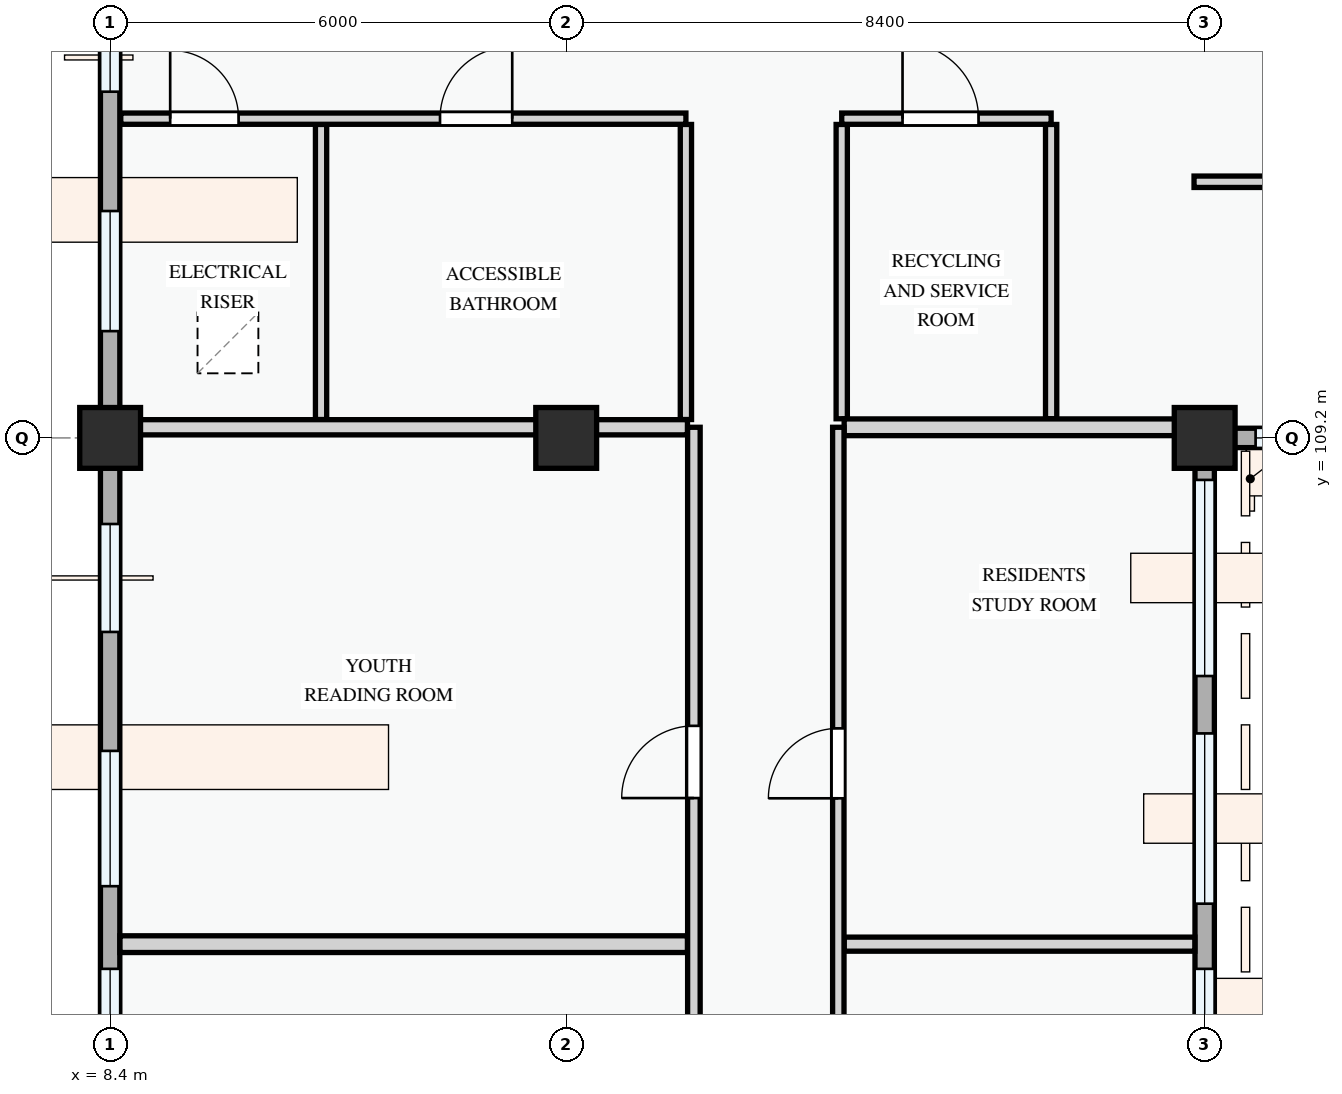
"""IFC4 building model, lengths in metres.
Left out: names, types, materials, properties, quantities, classifications, styles, units other than length and angle.
Written with IfcOpenShell. Run it as: python <this file> out.ifc"""

import sys

from ifc_helpers import new_model, si_unit, direction, frame, frame_2d, origin, origin_2d, place, context, subcontext, project, spatial, rectangle, extrude, element, fill, save


model = new_model("IFC4")
c1 = context("Model", 3, precision=1e-05, world=origin(), true_north=direction((0.0, 1.0)))
c2 = subcontext(c1, "Body", "Model", "MODEL_VIEW")
j1 = project(units=[si_unit("LENGTHUNIT", "METRE"), si_unit("PLANEANGLEUNIT", "RADIAN")], contexts=[c1])
p1 = place(None, origin())
s1 = spatial("IfcSite", under=j1, at=p1, CompositionType="ELEMENT")
p2 = place(p1, origin())
s2 = spatial("IfcBuilding", under=s1, at=p2, CompositionType="ELEMENT")
p3 = place(p2, frame((0.0, 0.0, 4.5)))
s3 = spatial("IfcBuildingStorey", under=s2, at=p3, CompositionType="ELEMENT", Elevation=4.5)
for number, where, z_axis, x_axis in (
    (1, (8.4, 109.2, 0.0), (0.0, 0.0, 1.0), (1.0, 0.0, 0.0)),
    (2, (14.4, 109.2, 0.0), (0.0, 0.0, 1.0), (1.0, 0.0, 0.0)),
    (3, (22.8, 109.2, 0.0), (0.0, 0.0, 1.0), (1.0, 0.0, 0.0)),
):
    element("IfcColumn", number, at=place(p3, frame(where, z_axis=z_axis, x_axis=x_axis)), inside=s3, PredefinedType="COLUMN", context=c2, shape_type="SweptSolid", body=[
        extrude(rectangle(XDim=0.8, YDim=0.8, at=origin_2d()), origin(), (0.0, 0.0, 1.0), 3.6),
    ])
p4 = place(p3, frame((22.8, 109.2, 0.0), z_axis=(0.0, 0.0, 1.0), x_axis=(1.0, 0.0, 0.0)))
e4 = element("IfcWall", 4, at=p4, inside=s3, PredefinedType="STANDARD", context=c2, shape_type="SweptSolid", body=[
    extrude(rectangle(XDim=6.0, YDim=0.255, at=frame_2d((3.0, 0.0))), origin(), (0.0, 0.0, 1.0), 2.775),
])
p5 = place(p4, frame((0.67, 0.0, 0.78)))
e5 = element("IfcOpeningElement", 5, at=p5, cuts=e4, PredefinedType="OPENING", context=c2, shape_type="SweptSolid", body=[
    extrude(rectangle(XDim=1.2, YDim=1.5, at=frame_2d((0.6, 0.75))), frame((0.0, 0.137, 0.0), z_axis=(0.0, -1.0, 0.0), x_axis=(1.0, 0.0, 0.0)), (0.0, 0.0, 1.0), 0.275),
])
p6 = place(p4, frame((2.88, 0.0, 0.78)))
e6 = element("IfcOpeningElement", 6, at=p6, cuts=e4, PredefinedType="OPENING", context=c2, shape_type="SweptSolid", body=[
    extrude(rectangle(XDim=2.4, YDim=1.85, at=frame_2d((1.2, 0.925))), frame((0.0, 0.137, 0.0), z_axis=(0.0, -1.0, 0.0), x_axis=(1.0, 0.0, 0.0)), (0.0, 0.0, 1.0), 0.275),
])
p7 = place(p3, frame((8.4, 115.2, 0.0), z_axis=(0.0, 0.0, 1.0), x_axis=(0.0, -1.0, 0.0)))
e7 = element("IfcWall", 7, at=p7, inside=s3, PredefinedType="STANDARD", context=c2, shape_type="SweptSolid", body=[
    extrude(rectangle(XDim=6.0, YDim=0.255, at=frame_2d((3.0, 0.0))), origin(), (0.0, 0.0, 1.0), 2.875),
])
p8 = place(p7, frame((0.545, 0.0, 0.78)))
e8 = element("IfcOpeningElement", 8, at=p8, cuts=e7, PredefinedType="OPENING", context=c2, shape_type="SweptSolid", body=[
    extrude(rectangle(XDim=0.9, YDim=1.2, at=frame_2d((0.45, 0.6))), frame((0.0, 0.137, 0.0), z_axis=(0.0, -1.0, 0.0), x_axis=(1.0, 0.0, 0.0)), (0.0, 0.0, 1.0), 0.275),
])
p9 = place(p7, frame((3.015, 0.0, 0.78)))
e9 = element("IfcOpeningElement", 9, at=p9, cuts=e7, PredefinedType="OPENING", context=c2, shape_type="SweptSolid", body=[
    extrude(rectangle(XDim=1.58, YDim=1.48, at=frame_2d((0.79, 0.74))), frame((0.0, 0.137, 0.0), z_axis=(0.0, -1.0, 0.0), x_axis=(1.0, 0.0, 0.0)), (0.0, 0.0, 1.0), 0.275),
])
p10 = place(p3, frame((8.4, 109.2, 0.0), z_axis=(0.0, 0.0, 1.0), x_axis=(0.0, -1.0, 0.0)))
e10 = element("IfcWall", 10, at=p10, inside=s3, PredefinedType="STANDARD", context=c2, shape_type="SweptSolid", body=[
    extrude(rectangle(XDim=8.4, YDim=0.255, at=frame_2d((4.2, 0.0))), origin(), (0.0, 0.0, 1.0), 2.725),
])
p11 = place(p10, frame((1.133, 0.0, 0.78)))
e11 = element("IfcOpeningElement", 11, at=p11, cuts=e10, PredefinedType="OPENING", context=c2, shape_type="SweptSolid", body=[
    extrude(rectangle(XDim=1.42, YDim=1.38, at=frame_2d((0.71, 0.69))), frame((0.0, 0.137, 0.0), z_axis=(0.0, -1.0, 0.0), x_axis=(1.0, 0.0, 0.0)), (0.0, 0.0, 1.0), 0.275),
])
p12 = place(p10, frame((4.117, 0.0, 0.78)))
e12 = element("IfcOpeningElement", 12, at=p12, cuts=e10, PredefinedType="OPENING", context=c2, shape_type="SweptSolid", body=[
    extrude(rectangle(XDim=1.78, YDim=1.42, at=frame_2d((0.89, 0.71))), frame((0.0, 0.137, 0.0), z_axis=(0.0, -1.0, 0.0), x_axis=(1.0, 0.0, 0.0)), (0.0, 0.0, 1.0), 0.275),
])
p13 = place(p10, frame((6.985, 0.0, 0.78)))
e13 = element("IfcOpeningElement", 13, at=p13, cuts=e10, PredefinedType="OPENING", context=c2, shape_type="SweptSolid", body=[
    extrude(rectangle(XDim=0.9, YDim=1.2, at=frame_2d((0.45, 0.6))), frame((0.0, 0.137, 0.0), z_axis=(0.0, -1.0, 0.0), x_axis=(1.0, 0.0, 0.0)), (0.0, 0.0, 1.0), 0.275),
])
p14 = place(p3, frame((22.8, 100.8, 0.0), z_axis=(0.0, 0.0, 1.0), x_axis=(0.0, 1.0, 0.0)))
e14 = element("IfcWall", 14, at=p14, inside=s3, PredefinedType="STANDARD", context=c2, shape_type="SweptSolid", body=[
    extrude(rectangle(XDim=8.4, YDim=0.255, at=frame_2d((4.2, 0.0))), origin(), (0.0, 0.0, 1.0), 2.725),
])
p15 = place(p14, frame((0.515, 0.0, 0.78)))
e15 = element("IfcOpeningElement", 15, at=p15, cuts=e14, PredefinedType="OPENING", context=c2, shape_type="SweptSolid", body=[
    extrude(rectangle(XDim=0.9, YDim=1.2, at=frame_2d((0.45, 0.6))), frame((0.0, 0.137, 0.0), z_axis=(0.0, -1.0, 0.0), x_axis=(1.0, 0.0, 0.0)), (0.0, 0.0, 1.0), 0.275),
])
p16 = place(p14, frame((2.272, 0.0, 0.78)))
e16 = element("IfcOpeningElement", 16, at=p16, cuts=e14, PredefinedType="OPENING", context=c2, shape_type="SweptSolid", body=[
    extrude(rectangle(XDim=2.24, YDim=1.52, at=frame_2d((1.12, 0.76))), frame((0.0, 0.137, 0.0), z_axis=(0.0, -1.0, 0.0), x_axis=(1.0, 0.0, 0.0)), (0.0, 0.0, 1.0), 0.275),
])
p17 = place(p14, frame((5.268, 0.0, 0.78)))
e17 = element("IfcOpeningElement", 17, at=p17, cuts=e14, PredefinedType="OPENING", context=c2, shape_type="SweptSolid", body=[
    extrude(rectangle(XDim=2.58, YDim=1.48, at=frame_2d((1.29, 0.74))), frame((0.0, 0.137, 0.0), z_axis=(0.0, -1.0, 0.0), x_axis=(1.0, 0.0, 0.0)), (0.0, 0.0, 1.0), 0.275),
])
for number, where, z_axis, x_axis in (
    (18, (11.175, 113.324, 0.0), (0.0, 0.0, 1.0), (0.0, -1.0, 0.0)),
    (19, (15.975, 113.324, 0.0), (0.0, 0.0, 1.0), (0.0, -1.0, 0.0)),
):
    element("IfcWall", number, at=place(p3, frame(where, z_axis=z_axis, x_axis=x_axis)), inside=s3, PredefinedType="PARTITIONING", context=c2, shape_type="SweptSolid", body=[
        extrude(rectangle(XDim=3.882, YDim=0.148, at=frame_2d((1.941, 0.0))), origin(), (0.0, 0.0, 1.0), 3.3),
    ])
for number, where, z_axis, x_axis in (
    (20, (18.025, 113.324, 0.0), (0.0, 0.0, 1.0), (0.0, -1.0, 0.0)),
    (21, (20.78, 113.324, 0.0), (0.0, 0.0, 1.0), (0.0, -1.0, 0.0)),
):
    element("IfcWall", number, at=place(p3, frame(where, z_axis=z_axis, x_axis=x_axis)), inside=s3, PredefinedType="PARTITIONING", context=c2, shape_type="SweptSolid", body=[
        extrude(rectangle(XDim=3.872, YDim=0.148, at=frame_2d((1.936, 0.0))), origin(), (0.0, 0.0, 1.0), 3.3),
    ])
p18 = place(p3, frame((8.54, 113.4, 0.0), z_axis=(0.0, 0.0, 1.0), x_axis=(1.0, 0.0, 0.0)))
e22 = element("IfcWall", 22, at=p18, inside=s3, PredefinedType="PARTITIONING", context=c2, shape_type="SweptSolid", body=[
    extrude(rectangle(XDim=7.435, YDim=0.148, at=frame_2d((3.718, 0.0))), origin(), (0.0, 0.0, 1.0), 3.3),
])
p19 = place(p18, frame((0.65, 0.0, 0.0)))
e23 = element("IfcOpeningElement", 23, at=p19, cuts=e22, PredefinedType="OPENING", context=c2, shape_type="SweptSolid", body=[
    extrude(rectangle(XDim=0.9, YDim=2.1, at=frame_2d((0.45, 1.05))), frame((0.0, 0.084, 0.0), z_axis=(0.0, -1.0, 0.0), x_axis=(1.0, 0.0, 0.0)), (0.0, 0.0, 1.0), 0.168),
])
p20 = place(p18, frame((4.2, 0.0, 0.0)))
e24 = element("IfcOpeningElement", 24, at=p20, cuts=e22, PredefinedType="OPENING", context=c2, shape_type="SweptSolid", body=[
    extrude(rectangle(XDim=0.95, YDim=2.1, at=frame_2d((0.475, 1.05))), frame((0.0, 0.084, 0.0), z_axis=(0.0, -1.0, 0.0), x_axis=(1.0, 0.0, 0.0)), (0.0, 0.0, 1.0), 0.168),
])
p21 = place(p3, frame((18.025, 113.4, 0.0), z_axis=(0.0, 0.0, 1.0), x_axis=(1.0, 0.0, 0.0)))
e25 = element("IfcWall", 25, at=p21, inside=s3, PredefinedType="PARTITIONING", context=c2, shape_type="SweptSolid", body=[
    extrude(rectangle(XDim=2.755, YDim=0.148, at=frame_2d((1.377, 0.0))), origin(), (0.0, 0.0, 1.0), 3.3),
])
p22 = place(p21, frame((0.8, 0.0, 0.0)))
e26 = element("IfcOpeningElement", 26, at=p22, cuts=e25, PredefinedType="OPENING", context=c2, shape_type="SweptSolid", body=[
    extrude(rectangle(XDim=1.0, YDim=2.15, at=frame_2d((0.5, 1.075))), frame((0.0, 0.084, 0.0), z_axis=(0.0, -1.0, 0.0), x_axis=(1.0, 0.0, 0.0)), (0.0, 0.0, 1.0), 0.168),
])
p23 = place(p3, frame((22.66, 112.57, 0.0), z_axis=(0.0, 0.0, 1.0), x_axis=(1.0, 0.0, 0.0)))
e27 = element("IfcWall", 27, at=p23, inside=s3, PredefinedType="PARTITIONING", context=c2, shape_type="SweptSolid", body=[
    extrude(rectangle(XDim=2.406, YDim=0.15, at=frame_2d((1.203, 0.0))), origin(), (0.0, 0.0, 1.0), 3.3),
])
p24 = place(p3, frame((8.53, 102.54, 0.0), z_axis=(0.0, 0.0, 1.0), x_axis=(1.0, 0.0, 0.0)))
e28 = element("IfcWall", 28, at=p24, inside=s3, PredefinedType="PARTITIONING", context=c2, shape_type="SweptSolid", body=[
    extrude(rectangle(XDim=7.466, YDim=0.22, at=frame_2d((3.733, 0.0))), origin(), (0.0, 0.0, 1.0), 3.3),
])
p25 = place(p3, frame((18.057, 102.54, 0.0), z_axis=(0.0, 0.0, 1.0), x_axis=(1.0, 0.0, 0.0)))
e29 = element("IfcWall", 29, at=p25, inside=s3, PredefinedType="PARTITIONING", context=c2, shape_type="SweptSolid", body=[
    extrude(rectangle(XDim=4.614, YDim=0.185, at=frame_2d((2.307, 0.0))), origin(), (0.0, 0.0, 1.0), 3.3),
])
p26 = place(p3, frame((8.53, 109.34, 0.0), z_axis=(0.0, 0.0, 1.0), x_axis=(1.0, 0.0, 0.0)))
e30 = element("IfcWall", 30, at=p26, inside=s3, PredefinedType="PARTITIONING", context=c2, shape_type="SweptSolid", body=[
    extrude(rectangle(XDim=7.466, YDim=0.2, at=frame_2d((3.733, 0.0))), origin(), (0.0, 0.0, 1.0), 2.675),
])
p27 = place(p3, frame((18.057, 109.34, 0.0), z_axis=(0.0, 0.0, 1.0), x_axis=(1.0, 0.0, 0.0)))
e31 = element("IfcWall", 31, at=p27, inside=s3, PredefinedType="PARTITIONING", context=c2, shape_type="SweptSolid", body=[
    extrude(rectangle(XDim=4.683, YDim=0.22, at=frame_2d((2.342, 0.0))), origin(), (0.0, 0.0, 1.0), 2.675),
])
p28 = place(p3, frame((16.08, 72.06, 0.0), z_axis=(0.0, 0.0, 1.0), x_axis=(0.0, 1.0, 0.0)))
e32 = element("IfcWall", 32, at=p28, inside=s3, PredefinedType="PARTITIONING", context=c2, shape_type="SweptSolid", body=[
    extrude(rectangle(XDim=37.28, YDim=0.165, at=frame_2d((18.64, 0.0))), origin(), (0.0, 0.0, 1.0), 3.3),
])
p29 = place(p28, frame((3.772, 0.0, 0.0)))
e33 = element("IfcOpeningElement", 33, at=p29, cuts=e32, PredefinedType="OPENING", context=c2, shape_type="SweptSolid", body=[
    extrude(rectangle(XDim=0.95, YDim=2.1, at=frame_2d((0.475, 1.05))), frame((0.0, 0.093, 0.0), z_axis=(0.0, -1.0, 0.0), x_axis=(1.0, 0.0, 0.0)), (0.0, 0.0, 1.0), 0.185),
])
p30 = place(p28, frame((17.946, 0.0, 0.0)))
e34 = element("IfcOpeningElement", 34, at=p30, cuts=e32, PredefinedType="OPENING", context=c2, shape_type="SweptSolid", body=[
    extrude(rectangle(XDim=0.95, YDim=2.1, at=frame_2d((0.475, 1.05))), frame((0.0, 0.093, 0.0), z_axis=(0.0, -1.0, 0.0), x_axis=(1.0, 0.0, 0.0)), (0.0, 0.0, 1.0), 0.185),
])
p31 = place(p28, frame((25.364, 0.0, 0.0)))
e35 = element("IfcOpeningElement", 35, at=p31, cuts=e32, PredefinedType="OPENING", context=c2, shape_type="SweptSolid", body=[
    extrude(rectangle(XDim=0.95, YDim=2.1, at=frame_2d((0.475, 1.05))), frame((0.0, 0.093, 0.0), z_axis=(0.0, -1.0, 0.0), x_axis=(1.0, 0.0, 0.0)), (0.0, 0.0, 1.0), 0.185),
])
p32 = place(p28, frame((32.402, 0.0, 0.0)))
e36 = element("IfcOpeningElement", 36, at=p32, cuts=e32, PredefinedType="OPENING", context=c2, shape_type="SweptSolid", body=[
    extrude(rectangle(XDim=0.95, YDim=2.1, at=frame_2d((0.475, 1.05))), frame((0.0, 0.093, 0.0), z_axis=(0.0, -1.0, 0.0), x_axis=(1.0, 0.0, 0.0)), (0.0, 0.0, 1.0), 0.185),
])
p33 = place(p3, frame((17.98, 72.06, 0.0), z_axis=(0.0, 0.0, 1.0), x_axis=(0.0, 1.0, 0.0)))
e37 = element("IfcWall", 37, at=p33, inside=s3, PredefinedType="PARTITIONING", context=c2, shape_type="SweptSolid", body=[
    extrude(rectangle(XDim=37.28, YDim=0.15, at=frame_2d((18.64, 0.0))), origin(), (0.0, 0.0, 1.0), 3.3),
])
p34 = place(p33, frame((3.768, 0.0, 0.0)))
e38 = element("IfcOpeningElement", 38, at=p34, cuts=e37, PredefinedType="OPENING", context=c2, shape_type="SweptSolid", body=[
    extrude(rectangle(XDim=0.92, YDim=2.1, at=frame_2d((0.46, 1.05))), frame((0.0, 0.085, 0.0), z_axis=(0.0, -1.0, 0.0), x_axis=(1.0, 0.0, 0.0)), (0.0, 0.0, 1.0), 0.17),
])
p35 = place(p33, frame((18.18, 0.0, 0.0)))
e39 = element("IfcOpeningElement", 39, at=p35, cuts=e37, PredefinedType="OPENING", context=c2, shape_type="SweptSolid", body=[
    extrude(rectangle(XDim=0.96, YDim=2.12, at=frame_2d((0.48, 1.06))), frame((0.0, 0.085, 0.0), z_axis=(0.0, -1.0, 0.0), x_axis=(1.0, 0.0, 0.0)), (0.0, 0.0, 1.0), 0.17),
])
p36 = place(p33, frame((25.358, 0.0, 0.0)))
e40 = element("IfcOpeningElement", 40, at=p36, cuts=e37, PredefinedType="OPENING", context=c2, shape_type="SweptSolid", body=[
    extrude(rectangle(XDim=0.92, YDim=2.1, at=frame_2d((0.46, 1.05))), frame((0.0, 0.085, 0.0), z_axis=(0.0, -1.0, 0.0), x_axis=(1.0, 0.0, 0.0)), (0.0, 0.0, 1.0), 0.17),
])
p37 = place(p33, frame((32.399, 0.0, 0.0)))
e41 = element("IfcOpeningElement", 41, at=p37, cuts=e37, PredefinedType="OPENING", context=c2, shape_type="SweptSolid", body=[
    extrude(rectangle(XDim=0.92, YDim=2.1, at=frame_2d((0.46, 1.05))), frame((0.0, 0.085, 0.0), z_axis=(0.0, -1.0, 0.0), x_axis=(1.0, 0.0, 0.0)), (0.0, 0.0, 1.0), 0.17),
])
p38 = place(p5, origin())
e42 = element("IfcWindow", 42, at=p38, inside=s3, PartitioningType="SINGLE_PANEL", PredefinedType="WINDOW", context=c2, shape_type="SweptSolid", body=[
    extrude(rectangle(XDim=1.2, YDim=1.5, at=frame_2d((0.6, 0.75))), frame((0.0, 0.03, 0.0), z_axis=(0.0, -1.0, 0.0), x_axis=(1.0, 0.0, 0.0)), (0.0, 0.0, 1.0), 0.06),
])
fill(e5, e42)
p39 = place(p8, origin())
e43 = element("IfcWindow", 43, at=p39, inside=s3, PartitioningType="SINGLE_PANEL", PredefinedType="WINDOW", context=c2, shape_type="SweptSolid", body=[
    extrude(rectangle(XDim=0.9, YDim=1.2, at=frame_2d((0.45, 0.6))), frame((0.0, 0.03, 0.0), z_axis=(0.0, -1.0, 0.0), x_axis=(1.0, 0.0, 0.0)), (0.0, 0.0, 1.0), 0.06),
])
fill(e8, e43)
p40 = place(p9, origin())
e44 = element("IfcWindow", 44, at=p40, inside=s3, PartitioningType="SINGLE_PANEL", PredefinedType="WINDOW", context=c2, shape_type="SweptSolid", body=[
    extrude(rectangle(XDim=1.58, YDim=1.48, at=frame_2d((0.79, 0.74))), frame((0.0, 0.03, 0.0), z_axis=(0.0, -1.0, 0.0), x_axis=(1.0, 0.0, 0.0)), (0.0, 0.0, 1.0), 0.06),
])
fill(e9, e44)
p41 = place(p11, origin())
e45 = element("IfcWindow", 45, at=p41, inside=s3, PartitioningType="SINGLE_PANEL", PredefinedType="WINDOW", context=c2, shape_type="SweptSolid", body=[
    extrude(rectangle(XDim=1.42, YDim=1.38, at=frame_2d((0.71, 0.69))), frame((0.0, 0.03, 0.0), z_axis=(0.0, -1.0, 0.0), x_axis=(1.0, 0.0, 0.0)), (0.0, 0.0, 1.0), 0.06),
])
fill(e11, e45)
p42 = place(p12, origin())
e46 = element("IfcWindow", 46, at=p42, inside=s3, PartitioningType="DOUBLE_PANEL_VERTICAL", PredefinedType="WINDOW", context=c2, shape_type="SweptSolid", body=[
    extrude(rectangle(XDim=1.78, YDim=1.42, at=frame_2d((0.89, 0.71))), frame((0.0, 0.03, 0.0), z_axis=(0.0, -1.0, 0.0), x_axis=(1.0, 0.0, 0.0)), (0.0, 0.0, 1.0), 0.06),
])
fill(e12, e46)
p43 = place(p13, origin())
e47 = element("IfcWindow", 47, at=p43, inside=s3, PartitioningType="SINGLE_PANEL", PredefinedType="WINDOW", context=c2, shape_type="SweptSolid", body=[
    extrude(rectangle(XDim=0.9, YDim=1.2, at=frame_2d((0.45, 0.6))), frame((0.0, 0.03, 0.0), z_axis=(0.0, -1.0, 0.0), x_axis=(1.0, 0.0, 0.0)), (0.0, 0.0, 1.0), 0.06),
])
fill(e13, e47)
p44 = place(p15, origin())
e48 = element("IfcWindow", 48, at=p44, inside=s3, PartitioningType="SINGLE_PANEL", PredefinedType="WINDOW", context=c2, shape_type="SweptSolid", body=[
    extrude(rectangle(XDim=0.9, YDim=1.2, at=frame_2d((0.45, 0.6))), frame((0.0, 0.03, 0.0), z_axis=(0.0, -1.0, 0.0), x_axis=(1.0, 0.0, 0.0)), (0.0, 0.0, 1.0), 0.06),
])
fill(e15, e48)
p45 = place(p16, origin())
e49 = element("IfcWindow", 49, at=p45, inside=s3, PartitioningType="DOUBLE_PANEL_VERTICAL", PredefinedType="WINDOW", context=c2, shape_type="SweptSolid", body=[
    extrude(rectangle(XDim=2.24, YDim=1.52, at=frame_2d((1.12, 0.76))), frame((0.0, 0.03, 0.0), z_axis=(0.0, -1.0, 0.0), x_axis=(1.0, 0.0, 0.0)), (0.0, 0.0, 1.0), 0.06),
])
fill(e16, e49)
p46 = place(p17, origin())
e50 = element("IfcWindow", 50, at=p46, inside=s3, PartitioningType="DOUBLE_PANEL_VERTICAL", PredefinedType="WINDOW", context=c2, shape_type="SweptSolid", body=[
    extrude(rectangle(XDim=2.58, YDim=1.48, at=frame_2d((1.29, 0.74))), frame((0.0, 0.03, 0.0), z_axis=(0.0, -1.0, 0.0), x_axis=(1.0, 0.0, 0.0)), (0.0, 0.0, 1.0), 0.06),
])
fill(e17, e50)
p47 = place(p19, origin())
e51 = element("IfcDoor", 51, at=p47, inside=s3, OperationType="SINGLE_SWING_LEFT", PredefinedType="DOOR", context=c2, shape_type="SweptSolid", body=[
    extrude(rectangle(XDim=0.9, YDim=2.1, at=frame_2d((0.45, 1.05))), frame((0.0, 0.025, 0.0), z_axis=(0.0, -1.0, 0.0), x_axis=(1.0, 0.0, 0.0)), (0.0, 0.0, 1.0), 0.05),
])
fill(e23, e51)
p48 = place(p20, origin())
e52 = element("IfcDoor", 52, at=p48, inside=s3, OperationType="SINGLE_SWING_RIGHT", PredefinedType="DOOR", context=c2, shape_type="SweptSolid", body=[
    extrude(rectangle(XDim=0.95, YDim=2.1, at=frame_2d((0.475, 1.05))), frame((0.0, 0.025, 0.0), z_axis=(0.0, -1.0, 0.0), x_axis=(1.0, 0.0, 0.0)), (0.0, 0.0, 1.0), 0.05),
])
fill(e24, e52)
p49 = place(p22, origin())
e53 = element("IfcDoor", 53, at=p49, inside=s3, OperationType="SINGLE_SWING_LEFT", PredefinedType="DOOR", context=c2, shape_type="SweptSolid", body=[
    extrude(rectangle(XDim=1.0, YDim=2.15, at=frame_2d((0.5, 1.075))), frame((0.0, 0.025, 0.0), z_axis=(0.0, -1.0, 0.0), x_axis=(1.0, 0.0, 0.0)), (0.0, 0.0, 1.0), 0.05),
])
fill(e26, e53)
p50 = place(p32, origin())
e54 = element("IfcDoor", 54, at=p50, inside=s3, OperationType="SINGLE_SWING_LEFT", PredefinedType="DOOR", context=c2, shape_type="SweptSolid", body=[
    extrude(rectangle(XDim=0.95, YDim=2.1, at=frame_2d((0.475, 1.05))), frame((0.0, 0.025, 0.0), z_axis=(0.0, -1.0, 0.0), x_axis=(1.0, 0.0, 0.0)), (0.0, 0.0, 1.0), 0.05),
])
fill(e36, e54)
p51 = place(p37, origin())
e55 = element("IfcDoor", 55, at=p51, inside=s3, OperationType="SINGLE_SWING_LEFT", PredefinedType="DOOR", context=c2, shape_type="SweptSolid", body=[
    extrude(rectangle(XDim=0.92, YDim=2.1, at=frame_2d((0.46, 1.05))), frame((0.0, 0.025, 0.0), z_axis=(0.0, -1.0, 0.0), x_axis=(1.0, 0.0, 0.0)), (0.0, 0.0, 1.0), 0.05),
])
fill(e41, e55)
save(model, sys.argv[1])
